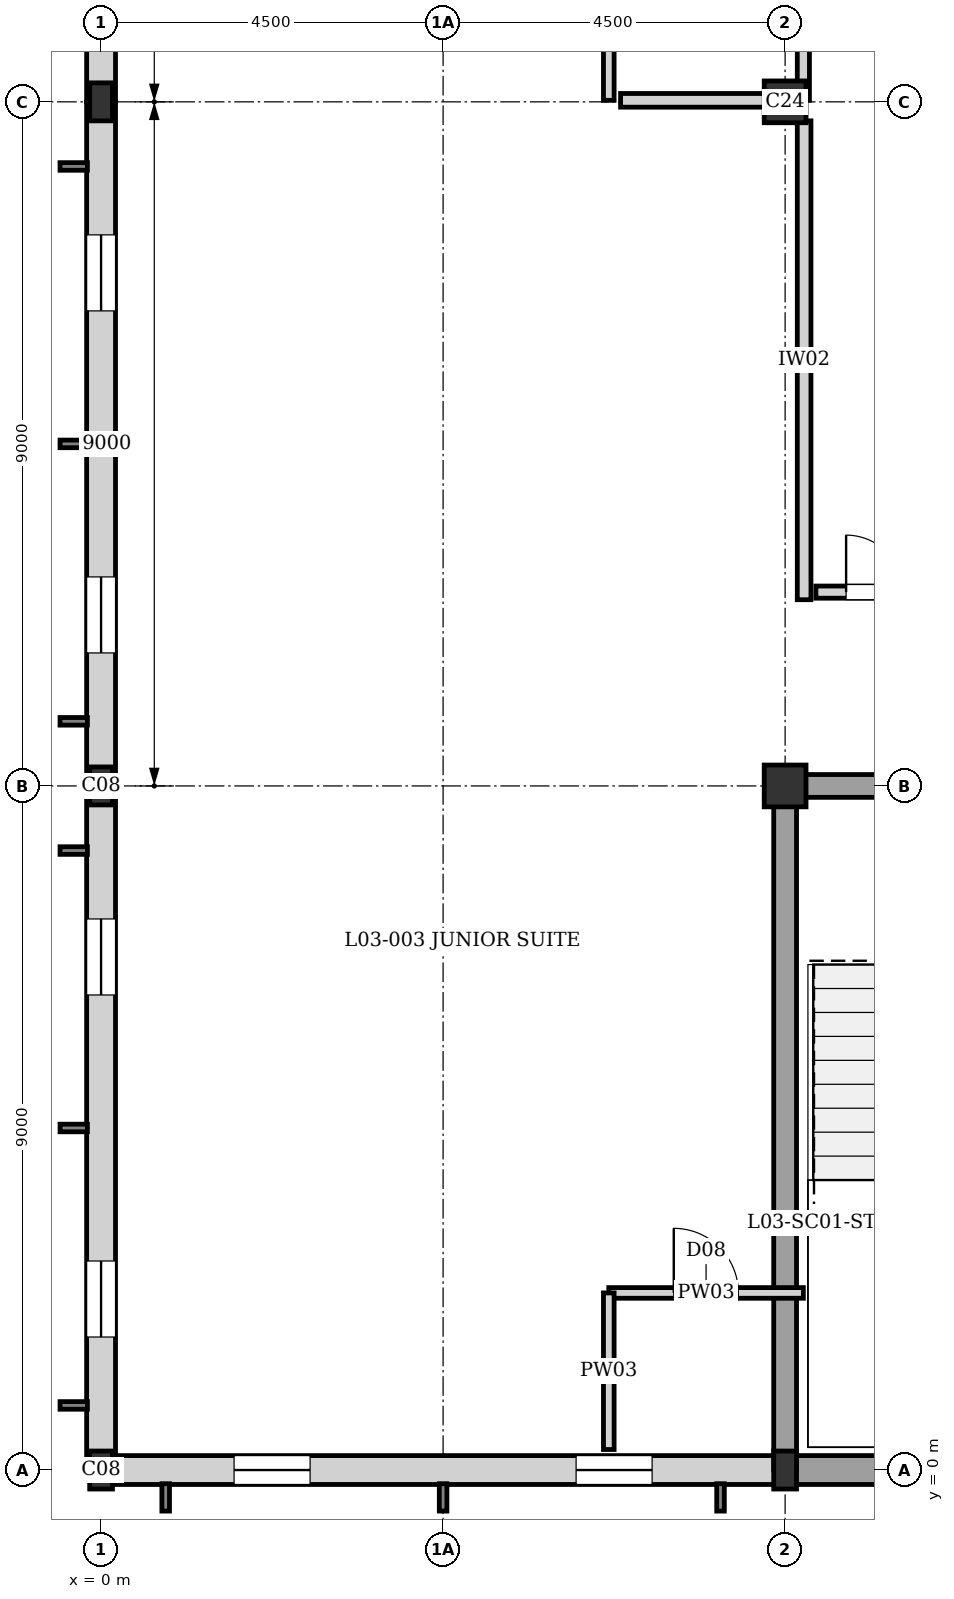
"""IFC4 building model, lengths in metres.
Left out: names, types, materials, properties, quantities, classifications, styles, units other than length and angle.
Written with IfcOpenShell. Run it as: python <this file> out.ifc"""

import sys

from ifc_helpers import new_model, si_unit, direction, frame, frame_2d, origin, origin_2d, place, context, subcontext, project, spatial, rectangle, i_section, extrude, element, fill, save


model = new_model("IFC4")
c1 = context("Model", 3, precision=1e-05, world=origin(), true_north=direction((0.0, 1.0)))
c2 = subcontext(c1, "Body", "Model", "MODEL_VIEW")
j1 = project(units=[si_unit("LENGTHUNIT", "METRE"), si_unit("PLANEANGLEUNIT", "RADIAN")], contexts=[c1])
p1 = place(None, origin())
s1 = spatial("IfcSite", under=j1, at=p1, CompositionType="ELEMENT")
p2 = place(p1, origin())
s2 = spatial("IfcBuilding", under=s1, at=p2, CompositionType="ELEMENT")
p3 = place(p2, frame((0.0, 0.0, 11.52)))
s3 = spatial("IfcBuildingStorey", under=s2, at=p3, CompositionType="ELEMENT", Elevation=11.52)
for number, where, z_axis, x_axis in (
    (1, (0.0, 0.0, 0.0), (0.0, 0.0, 1.0), (1.0, 0.0, 0.0)),
    (2, (0.0, 9.0, 0.0), (0.0, 0.0, 1.0), (1.0, 0.0, 0.0)),
    (3, (0.0, 18.0, 0.0), (0.0, 0.0, 1.0), (1.0, 0.0, 0.0)),
    (4, (9.0, 0.0, 0.0), (0.0, 0.0, 1.0), (1.0, 0.0, 0.0)),
):
    element("IfcColumn", number, at=place(p3, frame(where, z_axis=z_axis, x_axis=x_axis)), inside=s3, PredefinedType="COLUMN", context=c2, shape_type="SweptSolid", body=[
        extrude(i_section(OverallWidth=0.3, OverallDepth=0.5, WebThickness=0.014, FlangeThickness=0.028, at=origin_2d()), origin(), (0.0, 0.0, 1.0), 3.04),
    ])
for number, where, z_axis, x_axis in (
    (5, (9.0, 9.0, 0.0), (0.0, 0.0, 1.0), (1.0, 0.0, 0.0)),
    (6, (9.0, 18.0, 0.0), (0.0, 0.0, 1.0), (1.0, 0.0, 0.0)),
):
    element("IfcColumn", number, at=place(p3, frame(where, z_axis=z_axis, x_axis=x_axis)), inside=s3, PredefinedType="COLUMN", context=c2, shape_type="SweptSolid", body=[
        extrude(rectangle(XDim=0.55, YDim=0.55, at=origin_2d()), origin(), (0.0, 0.0, 1.0), 3.04),
    ])
p4 = place(p3, frame((18.0, 0.0, 0.0), z_axis=(0.0, 0.0, 1.0), x_axis=(-1.0, 0.0, 0.0)))
e7 = element("IfcWall", 7, at=p4, inside=s3, PredefinedType="SOLIDWALL", context=c2, shape_type="SweptSolid", body=[
    extrude(rectangle(XDim=9.0, YDim=0.38, at=frame_2d((4.5, 0.0))), origin(), (0.0, 0.0, 1.0), 2.82),
])
p5 = place(p3, frame((8.87, 0.0, 0.0), z_axis=(0.0, 0.0, 1.0), x_axis=(-1.0, 0.0, 0.0)))
e8 = element("IfcWall", 8, at=p5, inside=s3, PredefinedType="SOLIDWALL", context=c2, shape_type="SweptSolid", body=[
    extrude(rectangle(XDim=8.87, YDim=0.38, at=frame_2d((4.435, 0.0))), origin(), (0.0, 0.0, 1.0), 2.48),
])
p6 = place(p5, frame((1.62, 0.0, 0.35)))
e9 = element("IfcOpeningElement", 9, at=p6, cuts=e8, PredefinedType="OPENING", context=c2, shape_type="SweptSolid", body=[
    extrude(rectangle(XDim=1.0, YDim=1.6, at=frame_2d((0.5, 0.8))), frame((0.0, 0.2, 0.0), z_axis=(0.0, -1.0, 0.0), x_axis=(1.0, 0.0, 0.0)), (0.0, 0.0, 1.0), 0.4),
])
p7 = place(p5, frame((6.12, 0.0, 0.35)))
e10 = element("IfcOpeningElement", 10, at=p7, cuts=e8, PredefinedType="OPENING", context=c2, shape_type="SweptSolid", body=[
    extrude(rectangle(XDim=1.0, YDim=1.6, at=frame_2d((0.5, 0.8))), frame((0.0, 0.2, 0.0), z_axis=(0.0, -1.0, 0.0), x_axis=(1.0, 0.0, 0.0)), (0.0, 0.0, 1.0), 0.4),
])
p8 = place(p3, frame((0.0, 0.155, 0.0), z_axis=(0.0, 0.0, 1.0), x_axis=(0.0, 1.0, 0.0)))
e11 = element("IfcWall", 11, at=p8, inside=s3, PredefinedType="SOLIDWALL", context=c2, shape_type="SweptSolid", body=[
    extrude(rectangle(XDim=8.845, YDim=0.38, at=frame_2d((4.422, 0.0))), origin(), (0.0, 0.0, 1.0), 2.42),
])
p9 = place(p8, frame((1.595, 0.0, 0.35)))
e12 = element("IfcOpeningElement", 12, at=p9, cuts=e11, PredefinedType="OPENING", context=c2, shape_type="SweptSolid", body=[
    extrude(rectangle(XDim=1.0, YDim=1.6, at=frame_2d((0.5, 0.8))), frame((0.0, 0.2, 0.0), z_axis=(0.0, -1.0, 0.0), x_axis=(1.0, 0.0, 0.0)), (0.0, 0.0, 1.0), 0.4),
])
p10 = place(p8, frame((6.095, 0.0, 0.35)))
e13 = element("IfcOpeningElement", 13, at=p10, cuts=e11, PredefinedType="OPENING", context=c2, shape_type="SweptSolid", body=[
    extrude(rectangle(XDim=1.0, YDim=1.6, at=frame_2d((0.5, 0.8))), frame((0.0, 0.2, 0.0), z_axis=(0.0, -1.0, 0.0), x_axis=(1.0, 0.0, 0.0)), (0.0, 0.0, 1.0), 0.4),
])
p11 = place(p3, frame((0.0, 9.0, 0.0), z_axis=(0.0, 0.0, 1.0), x_axis=(0.0, 1.0, 0.0)))
e14 = element("IfcWall", 14, at=p11, inside=s3, PredefinedType="SOLIDWALL", context=c2, shape_type="SweptSolid", body=[
    extrude(rectangle(XDim=9.0, YDim=0.38, at=frame_2d((4.5, 0.0))), origin(), (0.0, 0.0, 1.0), 2.38),
])
p12 = place(p11, frame((1.75, 0.0, 0.35)))
e15 = element("IfcOpeningElement", 15, at=p12, cuts=e14, PredefinedType="OPENING", context=c2, shape_type="SweptSolid", body=[
    extrude(rectangle(XDim=1.0, YDim=1.6, at=frame_2d((0.5, 0.8))), frame((0.0, 0.2, 0.0), z_axis=(0.0, -1.0, 0.0), x_axis=(1.0, 0.0, 0.0)), (0.0, 0.0, 1.0), 0.4),
])
p13 = place(p11, frame((6.25, 0.0, 0.35)))
e16 = element("IfcOpeningElement", 16, at=p13, cuts=e14, PredefinedType="OPENING", context=c2, shape_type="SweptSolid", body=[
    extrude(rectangle(XDim=1.0, YDim=1.6, at=frame_2d((0.5, 0.8))), frame((0.0, 0.2, 0.0), z_axis=(0.0, -1.0, 0.0), x_axis=(1.0, 0.0, 0.0)), (0.0, 0.0, 1.0), 0.4),
])
p14 = place(p3, frame((0.0, 18.0, 0.0), z_axis=(0.0, 0.0, 1.0), x_axis=(0.0, 1.0, 0.0)))
e17 = element("IfcWall", 17, at=p14, inside=s3, PredefinedType="SOLIDWALL", context=c2, shape_type="SweptSolid", body=[
    extrude(rectangle(XDim=9.0, YDim=0.38, at=frame_2d((4.5, 0.0))), origin(), (0.0, 0.0, 1.0), 2.82),
])
p15 = place(p14, frame((1.75, 0.0, 0.35)))
e18 = element("IfcOpeningElement", 18, at=p15, cuts=e17, PredefinedType="OPENING", context=c2, shape_type="SweptSolid", body=[
    extrude(rectangle(XDim=1.0, YDim=1.6, at=frame_2d((0.5, 0.8))), frame((0.0, 0.2, 0.0), z_axis=(0.0, -1.0, 0.0), x_axis=(1.0, 0.0, 0.0)), (0.0, 0.0, 1.0), 0.4),
])
p16 = place(p14, frame((6.25, 0.0, 0.35)))
e19 = element("IfcOpeningElement", 19, at=p16, cuts=e17, PredefinedType="OPENING", context=c2, shape_type="SweptSolid", body=[
    extrude(rectangle(XDim=1.0, YDim=1.6, at=frame_2d((0.5, 0.8))), frame((0.0, 0.2, 0.0), z_axis=(0.0, -1.0, 0.0), x_axis=(1.0, 0.0, 0.0)), (0.0, 0.0, 1.0), 0.4),
])
p17 = place(p3, frame((9.0, 9.0, 0.0), z_axis=(0.0, 0.0, 1.0), x_axis=(1.0, 0.0, 0.0)))
e20 = element("IfcWall", 20, at=p17, inside=s3, PredefinedType="SHEAR", context=c2, shape_type="SweptSolid", body=[
    extrude(rectangle(XDim=9.0, YDim=0.3, at=frame_2d((4.5, 0.0))), origin(), (0.0, 0.0, 1.0), 2.82),
])
p18 = place(p17, frame((5.95, 0.0, 0.0)))
e21 = element("IfcOpeningElement", 21, at=p18, cuts=e20, PredefinedType="OPENING", context=c2, shape_type="SweptSolid", body=[
    extrude(rectangle(XDim=1.6, YDim=2.1, at=frame_2d((0.8, 1.05))), frame((0.0, 0.16, 0.0), z_axis=(0.0, -1.0, 0.0), x_axis=(1.0, 0.0, 0.0)), (0.0, 0.0, 1.0), 0.32),
])
p19 = place(p3, frame((9.0, 0.0, 0.0), z_axis=(0.0, 0.0, 1.0), x_axis=(0.0, 1.0, 0.0)))
e22 = element("IfcWall", 22, at=p19, inside=s3, PredefinedType="SHEAR", context=c2, shape_type="SweptSolid", body=[
    extrude(rectangle(XDim=9.0, YDim=0.3, at=frame_2d((4.5, 0.0))), origin(), (0.0, 0.0, 1.0), 2.82),
])
p20 = place(p3, frame((6.68, 2.33, 0.0), z_axis=(0.0, 0.0, 1.0), x_axis=(1.0, 0.0, 0.0)))
e23 = element("IfcWall", 23, at=p20, inside=s3, PredefinedType="PLUMBINGWALL", context=c2, shape_type="SweptSolid", body=[
    extrude(rectangle(XDim=2.56, YDim=0.14, at=frame_2d((1.28, 0.0))), origin(), (0.0, 0.0, 1.0), 2.82),
])
p21 = place(p20, frame((0.855, 0.0, 0.0)))
e24 = element("IfcOpeningElement", 24, at=p21, cuts=e23, PredefinedType="OPENING", context=c2, shape_type="SweptSolid", body=[
    extrude(rectangle(XDim=0.85, YDim=2.04, at=frame_2d((0.425, 1.02))), frame((0.0, 0.08, 0.0), z_axis=(0.0, -1.0, 0.0), x_axis=(1.0, 0.0, 0.0)), (0.0, 0.0, 1.0), 0.16),
])
p22 = place(p3, frame((6.68, 0.27, 0.0), z_axis=(0.0, 0.0, 1.0), x_axis=(0.0, 1.0, 0.0)))
e25 = element("IfcWall", 25, at=p22, inside=s3, PredefinedType="PLUMBINGWALL", context=c2, shape_type="SweptSolid", body=[
    extrude(rectangle(XDim=2.06, YDim=0.14, at=frame_2d((1.03, 0.0))), origin(), (0.0, 0.0, 1.0), 2.82),
])
p23 = place(p3, frame((9.24, 18.02, 0.0), z_axis=(0.0, 0.0, 1.0), x_axis=(0.0, 1.0, 0.0)))
e26 = element("IfcWall", 26, at=p23, inside=s3, PredefinedType="PARTITIONING", context=c2, shape_type="SweptSolid", body=[
    extrude(rectangle(XDim=2.06, YDim=0.16, at=frame_2d((1.03, 0.0))), origin(), (0.0, 0.0, 1.0), 2.82),
])
p24 = place(p3, frame((6.68, 18.02, 0.0), z_axis=(0.0, 0.0, 1.0), x_axis=(0.0, 1.0, 0.0)))
e27 = element("IfcWall", 27, at=p24, inside=s3, PredefinedType="PLUMBINGWALL", context=c2, shape_type="SweptSolid", body=[
    extrude(rectangle(XDim=2.06, YDim=0.14, at=frame_2d((1.03, 0.0))), origin(), (0.0, 0.0, 1.0), 2.82),
])
p25 = place(p3, frame((9.25, 11.45, 0.0), z_axis=(0.0, 0.0, 1.0), x_axis=(0.0, 1.0, 0.0)))
e28 = element("IfcWall", 28, at=p25, inside=s3, PredefinedType="PARTITIONING", context=c2, shape_type="SweptSolid", body=[
    extrude(rectangle(XDim=6.3, YDim=0.18, at=frame_2d((3.15, 0.0))), origin(), (0.0, 0.0, 1.0), 2.82),
])
p26 = place(p3, frame((6.835, 18.02, 0.0), z_axis=(0.0, 0.0, 1.0), x_axis=(1.0, 0.0, 0.0)))
e29 = element("IfcWall", 29, at=p26, inside=s3, PredefinedType="PARTITIONING", context=c2, shape_type="SweptSolid", body=[
    extrude(rectangle(XDim=2.26, YDim=0.18, at=frame_2d((1.13, 0.0))), origin(), (0.0, 0.0, 1.0), 2.48),
])
p27 = place(p3, frame((9.405, 11.55, 0.0), z_axis=(0.0, 0.0, 1.0), x_axis=(1.0, 0.0, 0.0)))
e30 = element("IfcWall", 30, at=p27, inside=s3, PredefinedType="PARTITIONING", context=c2, shape_type="SweptSolid", body=[
    extrude(rectangle(XDim=2.295, YDim=0.16, at=frame_2d((1.147, 0.0))), origin(), (0.0, 0.0, 1.0), 2.82),
])
p28 = place(p27, frame((0.397, 0.0, 0.0)))
e31 = element("IfcOpeningElement", 31, at=p28, cuts=e30, PredefinedType="OPENING", context=c2, shape_type="SweptSolid", body=[
    extrude(rectangle(XDim=1.5, YDim=2.1, at=frame_2d((0.75, 1.05))), frame((0.0, 0.09, 0.0), z_axis=(0.0, -1.0, 0.0), x_axis=(1.0, 0.0, 0.0)), (0.0, 0.0, 1.0), 0.18),
])
p29 = place(p6, origin())
e32 = element("IfcWindow", 32, at=p29, inside=s3, PartitioningType="SINGLE_PANEL", PredefinedType="WINDOW", context=c2, shape_type="SweptSolid", body=[
    extrude(rectangle(XDim=1.0, YDim=1.6, at=frame_2d((0.5, 0.8))), frame((0.0, 0.03, 0.0), z_axis=(0.0, -1.0, 0.0), x_axis=(1.0, 0.0, 0.0)), (0.0, 0.0, 1.0), 0.06),
])
fill(e9, e32)
p30 = place(p7, origin())
e33 = element("IfcWindow", 33, at=p30, inside=s3, PartitioningType="SINGLE_PANEL", PredefinedType="WINDOW", context=c2, shape_type="SweptSolid", body=[
    extrude(rectangle(XDim=1.0, YDim=1.6, at=frame_2d((0.5, 0.8))), frame((0.0, 0.03, 0.0), z_axis=(0.0, -1.0, 0.0), x_axis=(1.0, 0.0, 0.0)), (0.0, 0.0, 1.0), 0.06),
])
fill(e10, e33)
p31 = place(p9, origin())
e34 = element("IfcWindow", 34, at=p31, inside=s3, PartitioningType="SINGLE_PANEL", PredefinedType="WINDOW", context=c2, shape_type="SweptSolid", body=[
    extrude(rectangle(XDim=1.0, YDim=1.6, at=frame_2d((0.5, 0.8))), frame((0.0, 0.03, 0.0), z_axis=(0.0, -1.0, 0.0), x_axis=(1.0, 0.0, 0.0)), (0.0, 0.0, 1.0), 0.06),
])
fill(e12, e34)
p32 = place(p10, origin())
e35 = element("IfcWindow", 35, at=p32, inside=s3, PartitioningType="SINGLE_PANEL", PredefinedType="WINDOW", context=c2, shape_type="SweptSolid", body=[
    extrude(rectangle(XDim=1.0, YDim=1.6, at=frame_2d((0.5, 0.8))), frame((0.0, 0.03, 0.0), z_axis=(0.0, -1.0, 0.0), x_axis=(1.0, 0.0, 0.0)), (0.0, 0.0, 1.0), 0.06),
])
fill(e13, e35)
p33 = place(p12, origin())
e36 = element("IfcWindow", 36, at=p33, inside=s3, PartitioningType="SINGLE_PANEL", PredefinedType="WINDOW", context=c2, shape_type="SweptSolid", body=[
    extrude(rectangle(XDim=1.0, YDim=1.6, at=frame_2d((0.5, 0.8))), frame((0.0, 0.03, 0.0), z_axis=(0.0, -1.0, 0.0), x_axis=(1.0, 0.0, 0.0)), (0.0, 0.0, 1.0), 0.06),
])
fill(e15, e36)
p34 = place(p13, origin())
e37 = element("IfcWindow", 37, at=p34, inside=s3, PartitioningType="SINGLE_PANEL", PredefinedType="WINDOW", context=c2, shape_type="SweptSolid", body=[
    extrude(rectangle(XDim=1.0, YDim=1.6, at=frame_2d((0.5, 0.8))), frame((0.0, 0.03, 0.0), z_axis=(0.0, -1.0, 0.0), x_axis=(1.0, 0.0, 0.0)), (0.0, 0.0, 1.0), 0.06),
])
fill(e16, e37)
p35 = place(p21, origin())
e38 = element("IfcDoor", 38, at=p35, inside=s3, OperationType="SINGLE_SWING_LEFT", PredefinedType="DOOR", context=c2, shape_type="SweptSolid", body=[
    extrude(rectangle(XDim=0.85, YDim=2.04, at=frame_2d((0.425, 1.02))), frame((0.0, 0.025, 0.0), z_axis=(0.0, -1.0, 0.0), x_axis=(1.0, 0.0, 0.0)), (0.0, 0.0, 1.0), 0.05),
])
fill(e24, e38)
p36 = place(p28, origin())
e39 = element("IfcDoor", 39, at=p36, inside=s3, OperationType="DOUBLE_DOOR_SINGLE_SWING", PredefinedType="DOOR", context=c2, shape_type="SweptSolid", body=[
    extrude(rectangle(XDim=1.5, YDim=2.1, at=frame_2d((0.75, 1.05))), frame((0.0, 0.025, 0.0), z_axis=(0.0, -1.0, 0.0), x_axis=(1.0, 0.0, 0.0)), (0.0, 0.0, 1.0), 0.05),
])
fill(e31, e39)
save(model, sys.argv[1])
